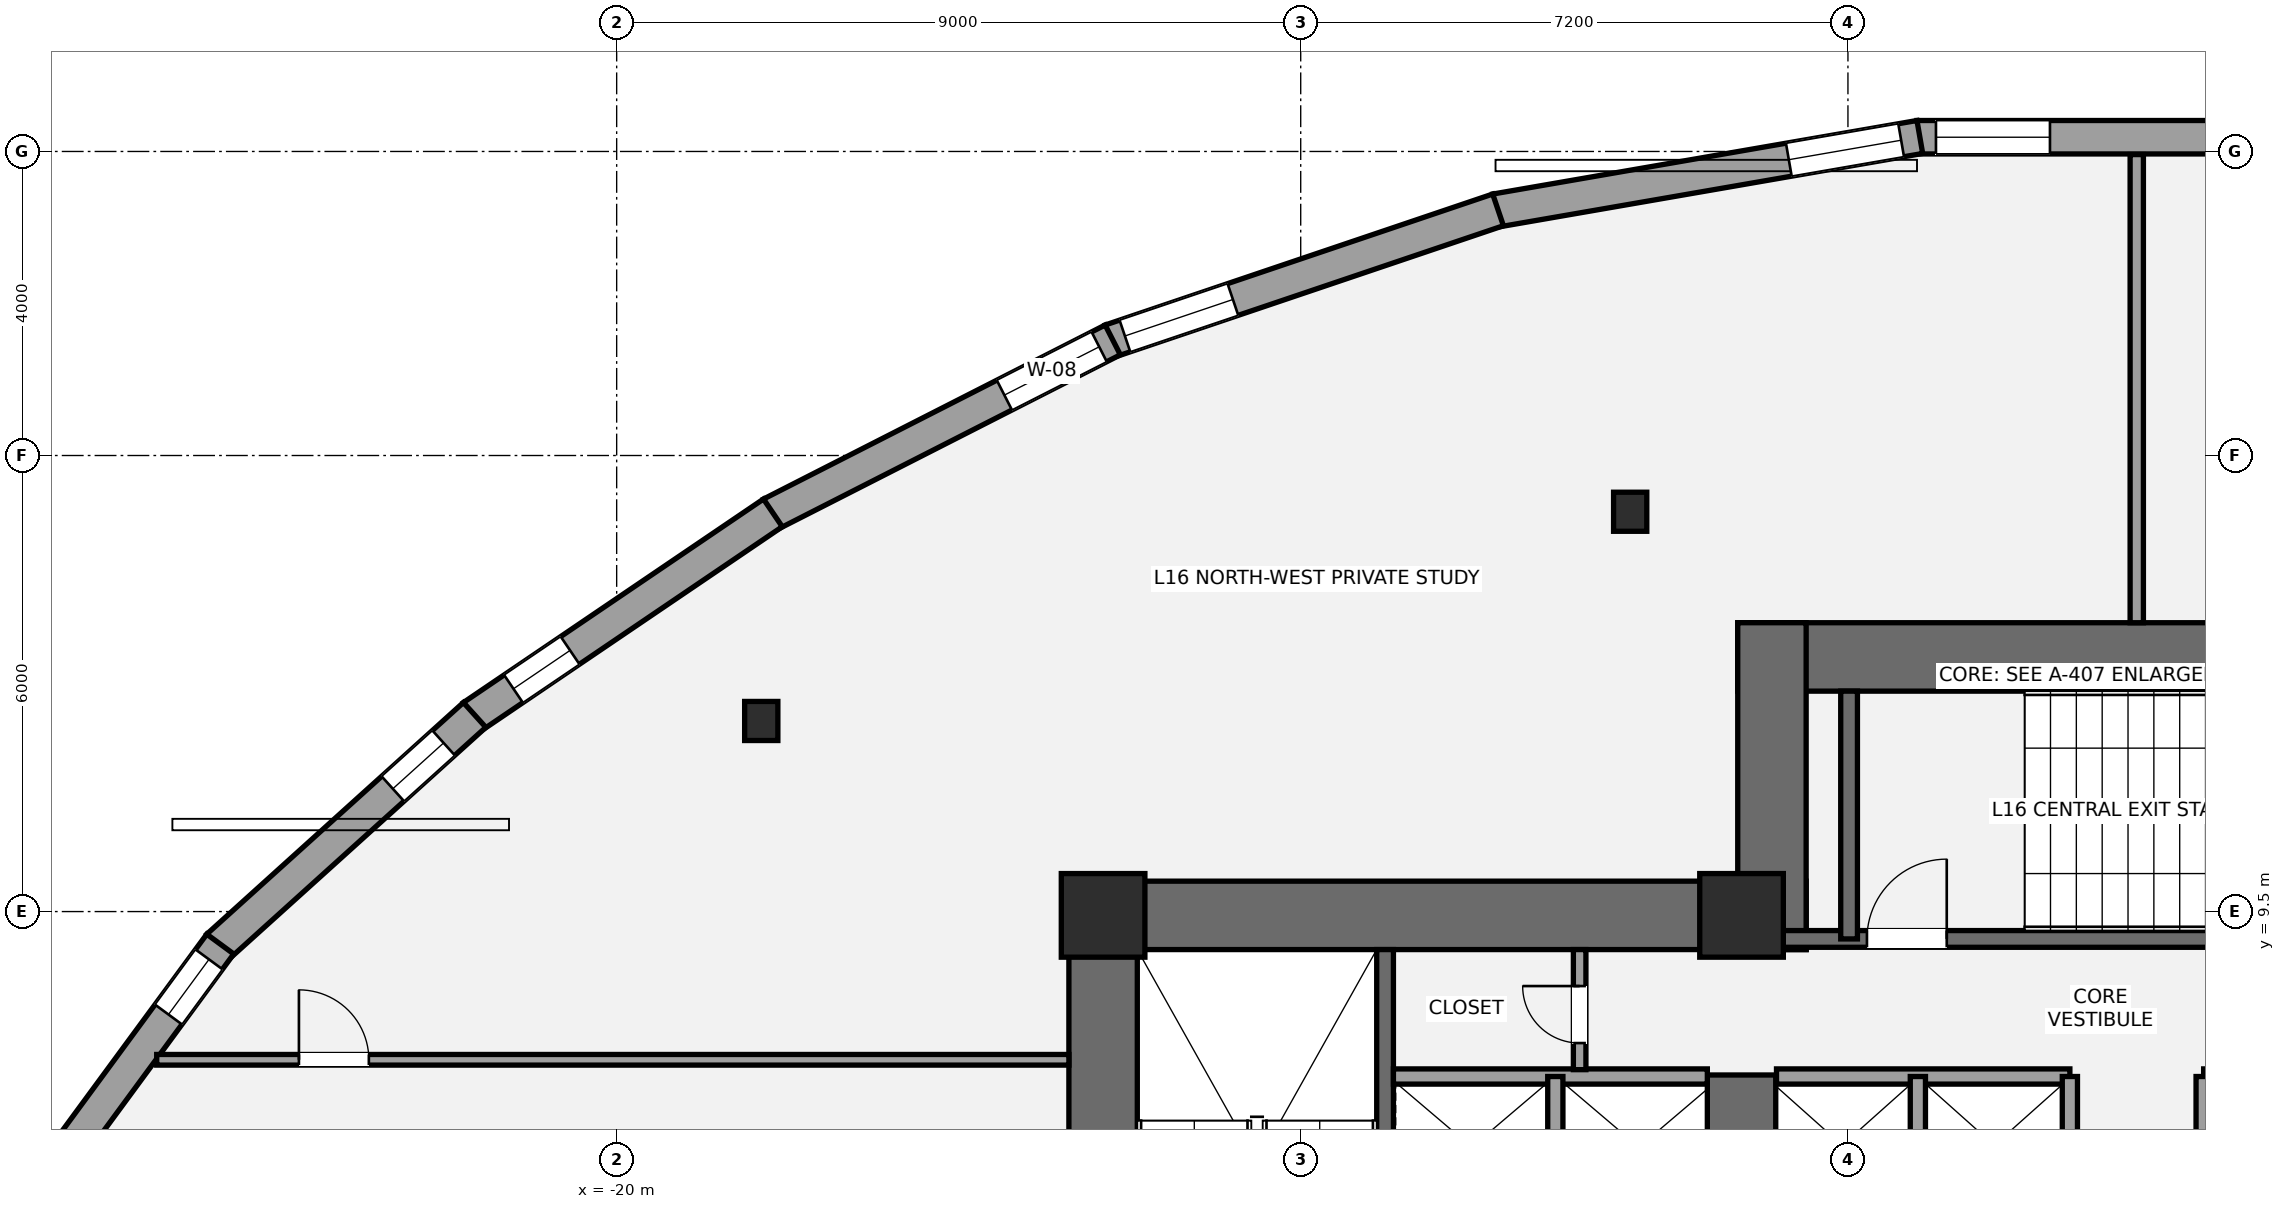
"""IFC4 building model, lengths in metres.
Left out: names, types, materials, properties, quantities, classifications, styles, units other than length and angle.
Written with IfcOpenShell. Run it as: python <this file> out.ifc"""

import sys

from ifc_helpers import new_model, si_unit, direction, frame, frame_2d, origin, origin_2d, place, context, subcontext, project, spatial, rectangle, i_section, extrude, element, fill, save


model = new_model("IFC4")
c1 = context("Model", 3, precision=1e-05, world=origin(), true_north=direction((0.0, 1.0)))
c2 = subcontext(c1, "Body", "Model", "MODEL_VIEW")
j1 = project(units=[si_unit("LENGTHUNIT", "METRE"), si_unit("PLANEANGLEUNIT", "RADIAN")], contexts=[c1])
p1 = place(None, origin())
s1 = spatial("IfcSite", under=j1, at=p1, CompositionType="ELEMENT")
p2 = place(p1, origin())
s2 = spatial("IfcBuilding", under=s1, at=p2, CompositionType="ELEMENT")
p3 = place(p2, frame((0.0, 0.0, 63.0)))
s3 = spatial("IfcBuildingStorey", under=s2, at=p3, CompositionType="ELEMENT", Elevation=63.0)
p4 = place(p3, frame((-13.6, 0.95, 0.0), z_axis=(0.0, 0.0, 1.0), x_axis=(0.0, 1.0, 0.0)))
e1 = element("IfcWall", 1, at=p4, inside=s3, PredefinedType="SHEAR", context=c2, shape_type="SweptSolid", body=[
    extrude(rectangle(XDim=8.95, YDim=0.9, at=frame_2d((4.475, 0.0))), origin(), (0.0, 0.0, 1.0), 3.6),
])
p5 = place(p3, frame((-14.05, 9.45, 0.0), z_axis=(0.0, 0.0, 1.0), x_axis=(1.0, 0.0, 0.0)))
e2 = element("IfcWall", 2, at=p5, inside=s3, PredefinedType="SHEAR", context=c2, shape_type="SweptSolid", body=[
    extrude(rectangle(XDim=9.7, YDim=0.9, at=frame_2d((4.85, 0.0))), origin(), (0.0, 0.0, 1.0), 3.6),
])
p6 = place(p3, frame((-5.2, 5.35, 0.0), z_axis=(0.0, 0.0, 1.0), x_axis=(0.0, 1.0, 0.0)))
e3 = element("IfcWall", 3, at=p6, inside=s3, PredefinedType="SHEAR", context=c2, shape_type="SweptSolid", body=[
    extrude(rectangle(XDim=2.0, YDim=0.9, at=frame_2d((1.0, 0.0))), origin(), (0.0, 0.0, 1.0), 3.6),
])
p7 = place(p3, frame((-9.89, 1.85, 0.0), z_axis=(0.0, 0.0, 1.0), x_axis=(0.0, 1.0, 0.0)))
e4 = element("IfcWall", 4, at=p7, inside=s3, PredefinedType="SHEAR", context=c2, shape_type="SweptSolid", body=[
    extrude(rectangle(XDim=7.15, YDim=0.22, at=frame_2d((3.575, 0.0))), origin(), (0.0, 0.0, 1.0), 3.6),
])
p8 = place(p3, frame((-5.25, 12.85, 0.0), z_axis=(0.0, 0.0, 1.0), x_axis=(1.0, 0.0, 0.0)))
e5 = element("IfcWall", 5, at=p8, inside=s3, PredefinedType="SHEAR", context=c2, shape_type="SweptSolid", body=[
    extrude(rectangle(XDim=10.5, YDim=0.9, at=frame_2d((5.25, 0.0))), origin(), (0.0, 0.0, 1.0), 3.6),
])
p9 = place(p3, frame((-4.8, 9.0, 0.0), z_axis=(0.0, 0.0, 1.0), x_axis=(0.0, 1.0, 0.0)))
e6 = element("IfcWall", 6, at=p9, inside=s3, PredefinedType="SHEAR", context=c2, shape_type="SweptSolid", body=[
    extrude(rectangle(XDim=4.3, YDim=0.9, at=frame_2d((2.15, 0.0))), origin(), (0.0, 0.0, 1.0), 3.6),
])
p10 = place(p3, frame((-4.7, 9.14, 0.0), z_axis=(0.0, 0.0, 1.0), x_axis=(1.0, 0.0, 0.0)))
e7 = element("IfcWall", 7, at=p10, inside=s3, PredefinedType="SHEAR", context=c2, shape_type="SweptSolid", body=[
    extrude(rectangle(XDim=9.3, YDim=0.22, at=frame_2d((4.65, 0.0))), origin(), (0.0, 0.0, 1.0), 3.6),
])
p11 = place(p10, frame((1.15, 0.0, 0.0)))
e8 = element("IfcOpeningElement", 8, at=p11, cuts=e7, PredefinedType="OPENING", context=c2, shape_type="SweptSolid", body=[
    extrude(rectangle(XDim=1.05, YDim=2.15, at=frame_2d((0.525, 1.075))), frame((0.0, 0.12, 0.0), z_axis=(0.0, -1.0, 0.0), x_axis=(1.0, 0.0, 0.0)), (0.0, 0.0, 1.0), 0.24),
])
p12 = place(p3, frame((-3.785, 9.14, 0.0), z_axis=(0.0, 0.0, 1.0), x_axis=(0.0, 1.0, 0.0)))
e9 = element("IfcWall", 9, at=p12, inside=s3, PredefinedType="SHEAR", context=c2, shape_type="SweptSolid", body=[
    extrude(rectangle(XDim=3.26, YDim=0.22, at=frame_2d((1.63, 0.0))), origin(), (0.0, 0.0, 1.0), 3.6),
])
for number, where, z_axis, x_axis in (
    (10, (-13.6, 9.45, 0.0), (0.0, 0.0, 1.0), (1.0, 0.0, 0.0)),
    (11, (-5.2, 9.45, 0.0), (0.0, 0.0, 1.0), (1.0, 0.0, 0.0)),
):
    element("IfcColumn", number, at=place(p3, frame(where, z_axis=z_axis, x_axis=x_axis)), inside=s3, PredefinedType="COLUMN", context=c2, shape_type="SweptSolid", body=[
        extrude(rectangle(XDim=1.1, YDim=1.1, at=origin_2d()), origin(), (0.0, 0.0, 1.0), 3.6),
    ])
for number, where, z_axis, x_axis in (
    (12, (-6.665, 14.76, 0.0), (0.0, 0.0, 1.0), (1.0, 0.0, 0.0)),
    (13, (-18.098, 12.007, 0.0), (0.0, 0.0, 1.0), (1.0, 0.0, 0.0)),
):
    element("IfcColumn", number, at=place(p3, frame(where, z_axis=z_axis, x_axis=x_axis)), inside=s3, PredefinedType="COLUMN", context=c2, shape_type="SweptSolid", body=[
        extrude(i_section(OverallWidth=0.437, OverallDepth=0.514, WebThickness=0.061, FlangeThickness=0.097, at=origin_2d()), origin(), (0.0, 0.0, 1.0), 3.6),
    ])
p13 = place(p3, frame((-2.892, 19.687, 0.0), z_axis=(0.0, 0.0, 1.0), x_axis=(1.0, 0.0, 0.0)))
e14 = element("IfcWall", 14, at=p13, inside=s3, PredefinedType="STANDARD", context=c2, shape_type="SweptSolid", body=[
    extrude(rectangle(XDim=5.784, YDim=0.44, at=frame_2d((2.892, 0.0))), origin(), (0.0, 0.0, 1.0), 2.529),
])
p14 = place(p13, frame((0.25, 0.0, 0.65)))
e15 = element("IfcOpeningElement", 15, at=p14, cuts=e14, PredefinedType="OPENING", context=c2, shape_type="SweptSolid", body=[
    extrude(rectangle(XDim=1.5, YDim=1.7, at=frame_2d((0.75, 0.85))), frame((0.0, 0.23, 0.0), z_axis=(0.0, -1.0, 0.0), x_axis=(1.0, 0.0, 0.0)), (0.0, 0.0, 1.0), 0.46),
])
p15 = place(p3, frame((-8.436, 18.723, 0.0), z_axis=(0.0, 0.0, 1.0), x_axis=(0.985308697227, 0.170782818716, 0.0)))
e16 = element("IfcWall", 16, at=p15, inside=s3, PredefinedType="STANDARD", context=c2, shape_type="SweptSolid", body=[
    extrude(rectangle(XDim=5.665, YDim=0.44, at=frame_2d((2.833, 0.0))), origin(), (0.0, 0.0, 1.0), 2.529),
])
p16 = place(p15, frame((3.916, 0.0, 0.65)))
e17 = element("IfcOpeningElement", 17, at=p16, cuts=e16, PredefinedType="OPENING", context=c2, shape_type="SweptSolid", body=[
    extrude(rectangle(XDim=1.5, YDim=1.7, at=frame_2d((0.75, 0.85))), frame((0.0, 0.23, 0.0), z_axis=(0.0, -1.0, 0.0), x_axis=(1.0, 0.0, 0.0)), (0.0, 0.0, 1.0), 0.46),
])
p17 = place(p3, frame((-13.502, 17.008, 0.0), z_axis=(0.0, 0.0, 1.0), x_axis=(0.947368862969, 0.320144088616, 0.0)))
e18 = element("IfcWall", 18, at=p17, inside=s3, PredefinedType="STANDARD", context=c2, shape_type="SweptSolid", body=[
    extrude(rectangle(XDim=5.382, YDim=0.44, at=frame_2d((2.691, 0.0))), origin(), (0.0, 0.0, 1.0), 2.529),
])
p18 = place(p17, frame((0.2, 0.0, 0.48)))
e19 = element("IfcOpeningElement", 19, at=p18, cuts=e18, PredefinedType="OPENING", context=c2, shape_type="SweptSolid", body=[
    extrude(rectangle(XDim=1.5, YDim=1.7, at=frame_2d((0.75, 0.85))), frame((0.0, 0.23, 0.0), z_axis=(0.0, -1.0, 0.0), x_axis=(1.0, 0.0, 0.0)), (0.0, 0.0, 1.0), 0.46),
])
p19 = place(p3, frame((-17.968, 14.731, 0.0), z_axis=(0.0, 0.0, 1.0), x_axis=(0.891072734441, 0.45386053137, 0.0)))
e20 = element("IfcWall", 20, at=p19, inside=s3, PredefinedType="STANDARD", context=c2, shape_type="SweptSolid", body=[
    extrude(rectangle(XDim=5.045, YDim=0.44, at=frame_2d((2.522, 0.0))), origin(), (0.0, 0.0, 1.0), 2.529),
])
p20 = place(p19, frame((3.445, 0.0, 0.58)))
e21 = element("IfcOpeningElement", 21, at=p20, cuts=e20, PredefinedType="OPENING", context=c2, shape_type="SweptSolid", body=[
    extrude(rectangle(XDim=1.4, YDim=1.55, at=frame_2d((0.7, 0.775))), frame((0.0, 0.23, 0.0), z_axis=(0.0, -1.0, 0.0), x_axis=(1.0, 0.0, 0.0)), (0.0, 0.0, 1.0), 0.46),
])
p21 = place(p3, frame((-21.893, 12.068, 0.0), z_axis=(0.0, 0.0, 1.0), x_axis=(0.827693991977, 0.561179699959, 0.0)))
e22 = element("IfcWall", 22, at=p21, inside=s3, PredefinedType="STANDARD", context=c2, shape_type="SweptSolid", body=[
    extrude(rectangle(XDim=4.77, YDim=0.44, at=frame_2d((2.385, 0.0))), origin(), (0.0, 0.0, 1.0), 2.529),
])
p22 = place(p21, frame((0.646, 0.0, 0.58)))
e23 = element("IfcOpeningElement", 23, at=p22, cuts=e22, PredefinedType="OPENING", context=c2, shape_type="SweptSolid", body=[
    extrude(rectangle(XDim=0.9, YDim=1.35, at=frame_2d((0.45, 0.675))), frame((0.0, 0.23, 0.0), z_axis=(0.0, -1.0, 0.0), x_axis=(1.0, 0.0, 0.0)), (0.0, 0.0, 1.0), 0.46),
])
p23 = place(p3, frame((-25.246, 9.039, 0.0), z_axis=(0.0, 0.0, 1.0), x_axis=(0.742354052059, 0.670007806963, 0.0)))
e24 = element("IfcWall", 24, at=p23, inside=s3, PredefinedType="STANDARD", context=c2, shape_type="SweptSolid", body=[
    extrude(rectangle(XDim=4.549, YDim=0.44, at=frame_2d((2.274, 0.0))), origin(), (0.0, 0.0, 1.0), 2.529),
])
p24 = place(p23, frame((3.099, 0.0, 0.58)))
e25 = element("IfcOpeningElement", 25, at=p24, cuts=e24, PredefinedType="OPENING", context=c2, shape_type="SweptSolid", body=[
    extrude(rectangle(XDim=0.9, YDim=1.35, at=frame_2d((0.45, 0.675))), frame((0.0, 0.23, 0.0), z_axis=(0.0, -1.0, 0.0), x_axis=(1.0, 0.0, 0.0)), (0.0, 0.0, 1.0), 0.46),
])
p25 = place(p3, frame((-27.757, 5.615, 0.0), z_axis=(0.0, 0.0, 1.0), x_axis=(0.592261182237, 0.80574604685, 0.0)))
e26 = element("IfcWall", 26, at=p25, inside=s3, PredefinedType="STANDARD", context=c2, shape_type="SweptSolid", body=[
    extrude(rectangle(XDim=4.291, YDim=0.44, at=frame_2d((2.146, 0.0))), origin(), (0.0, 0.0, 1.0), 2.529),
])
p26 = place(p25, frame((3.141, 0.0, 0.58)))
e27 = element("IfcOpeningElement", 27, at=p26, cuts=e26, PredefinedType="OPENING", context=c2, shape_type="SweptSolid", body=[
    extrude(rectangle(XDim=0.9, YDim=1.35, at=frame_2d((0.45, 0.675))), frame((0.0, 0.23, 0.0), z_axis=(0.0, -1.0, 0.0), x_axis=(1.0, 0.0, 0.0)), (0.0, 0.0, 1.0), 0.46),
])
p27 = place(p3, frame((-9.78, 7.33, 0.0), z_axis=(0.0, 0.0, 1.0), x_axis=(1.0, 0.0, 0.0)))
e28 = element("IfcWall", 28, at=p27, inside=s3, PredefinedType="SOLIDWALL", context=c2, shape_type="SweptSolid", body=[
    extrude(rectangle(XDim=4.13, YDim=0.2, at=frame_2d((2.065, 0.0))), origin(), (0.0, 0.0, 1.0), 3.4),
])
p28 = place(p3, frame((-7.65, 5.47, 0.0), z_axis=(0.0, 0.0, 1.0), x_axis=(0.0, 1.0, 0.0)))
e29 = element("IfcWall", 29, at=p28, inside=s3, PredefinedType="SOLIDWALL", context=c2, shape_type="SweptSolid", body=[
    extrude(rectangle(XDim=1.86, YDim=0.2, at=frame_2d((0.93, 0.0))), origin(), (0.0, 0.0, 1.0), 3.4),
])
for number, where, z_axis, x_axis in (
    (30, (-4.74, 7.33, 0.0), (0.0, 0.0, 1.0), (1.0, 0.0, 0.0)),
    (31, (0.88, 7.33, 0.0), (0.0, 0.0, 1.0), (1.0, 0.0, 0.0)),
):
    element("IfcWall", number, at=place(p3, frame(where, z_axis=z_axis, x_axis=x_axis)), inside=s3, PredefinedType="SOLIDWALL", context=c2, shape_type="SweptSolid", body=[
        extrude(rectangle(XDim=3.86, YDim=0.2, at=frame_2d((1.93, 0.0))), origin(), (0.0, 0.0, 1.0), 3.4),
    ])
for number, where, z_axis, x_axis in (
    (32, (-2.88, 5.52, 0.0), (0.0, 0.0, 1.0), (0.0, 1.0, 0.0)),
    (33, (-0.88, 5.52, 0.0), (0.0, 0.0, 1.0), (0.0, 1.0, 0.0)),
    (34, (0.88, 5.52, 0.0), (0.0, 0.0, 1.0), (0.0, 1.0, 0.0)),
):
    element("IfcWall", number, at=place(p3, frame(where, z_axis=z_axis, x_axis=x_axis)), inside=s3, PredefinedType="SOLIDWALL", context=c2, shape_type="SweptSolid", body=[
        extrude(rectangle(XDim=1.81, YDim=0.2, at=frame_2d((0.905, 0.0))), origin(), (0.0, 0.0, 1.0), 3.4),
    ])
p29 = place(p3, frame((-7.33, 7.42, 0.0), z_axis=(0.0, 0.0, 1.0), x_axis=(0.0, 1.0, 0.0)))
e35 = element("IfcWall", 35, at=p29, inside=s3, PredefinedType="PARTITIONING", context=c2, shape_type="SweptSolid", body=[
    extrude(rectangle(XDim=1.58, YDim=0.165, at=frame_2d((0.79, 0.0))), origin(), (0.0, 0.0, 1.0), 3.4),
])
p30 = place(p29, frame((0.35, 0.0, 0.0)))
e36 = element("IfcOpeningElement", 36, at=p30, cuts=e35, PredefinedType="OPENING", context=c2, shape_type="SweptSolid", body=[
    extrude(rectangle(XDim=0.75, YDim=2.1, at=frame_2d((0.375, 1.05))), frame((0.0, 0.093, 0.0), z_axis=(0.0, -1.0, 0.0), x_axis=(1.0, 0.0, 0.0)), (0.0, 0.0, 1.0), 0.185),
])
p31 = place(p3, frame((-26.052, 7.55, 0.0), z_axis=(0.0, 0.0, 1.0), x_axis=(1.0, 0.0, 0.0)))
e37 = element("IfcWall", 37, at=p31, inside=s3, PredefinedType="PARTITIONING", context=c2, shape_type="SweptSolid", body=[
    extrude(rectangle(XDim=12.002, YDim=0.14, at=frame_2d((6.001, 0.0))), origin(), (0.0, 0.0, 1.0), 2.853),
])
p32 = place(p31, frame((1.871, 0.0, 0.0)))
e38 = element("IfcOpeningElement", 38, at=p32, cuts=e37, PredefinedType="OPENING", context=c2, shape_type="SweptSolid", body=[
    extrude(rectangle(XDim=0.92, YDim=2.15, at=frame_2d((0.46, 1.075))), frame((0.0, 0.08, 0.0), z_axis=(0.0, -1.0, 0.0), x_axis=(1.0, 0.0, 0.0)), (0.0, 0.0, 1.0), 0.16),
])
p33 = place(p3, frame((0.0, 13.3, 0.0), z_axis=(0.0, 0.0, 1.0), x_axis=(0.0, 1.0, 0.0)))
e39 = element("IfcWall", 39, at=p33, inside=s3, PredefinedType="PARTITIONING", context=c2, shape_type="SweptSolid", body=[
    extrude(rectangle(XDim=6.159, YDim=0.175, at=frame_2d((3.08, 0.0))), origin(), (0.0, 0.0, 1.0), 3.4),
])
p34 = place(p14, origin())
e40 = element("IfcWindow", 40, at=p34, inside=s3, PartitioningType="SINGLE_PANEL", PredefinedType="WINDOW", context=c2, shape_type="SweptSolid", body=[
    extrude(rectangle(XDim=1.5, YDim=1.7, at=frame_2d((0.75, 0.85))), frame((0.0, -0.01, 0.0), z_axis=(0.0, -1.0, 0.0), x_axis=(1.0, 0.0, 0.0)), (0.0, 0.0, 1.0), 0.06),
])
fill(e15, e40)
p35 = place(p16, origin())
e41 = element("IfcWindow", 41, at=p35, inside=s3, PartitioningType="SINGLE_PANEL", PredefinedType="WINDOW", context=c2, shape_type="SweptSolid", body=[
    extrude(rectangle(XDim=1.5, YDim=1.7, at=frame_2d((0.75, 0.85))), frame((0.0, -0.01, 0.0), z_axis=(0.0, -1.0, 0.0), x_axis=(1.0, 0.0, 0.0)), (0.0, 0.0, 1.0), 0.06),
])
fill(e17, e41)
p36 = place(p18, origin())
e42 = element("IfcWindow", 42, at=p36, inside=s3, PartitioningType="SINGLE_PANEL", PredefinedType="WINDOW", context=c2, shape_type="SweptSolid", body=[
    extrude(rectangle(XDim=1.5, YDim=1.7, at=frame_2d((0.75, 0.85))), frame((0.0, -0.01, 0.0), z_axis=(0.0, -1.0, 0.0), x_axis=(1.0, 0.0, 0.0)), (0.0, 0.0, 1.0), 0.06),
])
fill(e19, e42)
p37 = place(p20, origin())
e43 = element("IfcWindow", 43, at=p37, inside=s3, PartitioningType="SINGLE_PANEL", PredefinedType="WINDOW", context=c2, shape_type="SweptSolid", body=[
    extrude(rectangle(XDim=1.4, YDim=1.55, at=frame_2d((0.7, 0.775))), frame((0.0, -0.01, 0.0), z_axis=(0.0, -1.0, 0.0), x_axis=(1.0, 0.0, 0.0)), (0.0, 0.0, 1.0), 0.06),
])
fill(e21, e43)
p38 = place(p22, origin())
e44 = element("IfcWindow", 44, at=p38, inside=s3, PartitioningType="SINGLE_PANEL", PredefinedType="WINDOW", context=c2, shape_type="SweptSolid", body=[
    extrude(rectangle(XDim=0.9, YDim=1.35, at=frame_2d((0.45, 0.675))), frame((0.0, -0.01, 0.0), z_axis=(0.0, -1.0, 0.0), x_axis=(1.0, 0.0, 0.0)), (0.0, 0.0, 1.0), 0.06),
])
fill(e23, e44)
p39 = place(p24, origin())
e45 = element("IfcWindow", 45, at=p39, inside=s3, PartitioningType="SINGLE_PANEL", PredefinedType="WINDOW", context=c2, shape_type="SweptSolid", body=[
    extrude(rectangle(XDim=0.9, YDim=1.35, at=frame_2d((0.45, 0.675))), frame((0.0, -0.01, 0.0), z_axis=(0.0, -1.0, 0.0), x_axis=(1.0, 0.0, 0.0)), (0.0, 0.0, 1.0), 0.06),
])
fill(e25, e45)
p40 = place(p26, origin())
e46 = element("IfcWindow", 46, at=p40, inside=s3, PartitioningType="SINGLE_PANEL", PredefinedType="WINDOW", context=c2, shape_type="SweptSolid", body=[
    extrude(rectangle(XDim=0.9, YDim=1.35, at=frame_2d((0.45, 0.675))), frame((0.0, -0.01, 0.0), z_axis=(0.0, -1.0, 0.0), x_axis=(1.0, 0.0, 0.0)), (0.0, 0.0, 1.0), 0.06),
])
fill(e27, e46)
p41 = place(p11, origin())
e47 = element("IfcDoor", 47, at=p41, inside=s3, OperationType="SINGLE_SWING_RIGHT", PredefinedType="DOOR", context=c2, shape_type="SweptSolid", body=[
    extrude(rectangle(XDim=1.05, YDim=2.15, at=frame_2d((0.525, 1.075))), frame((0.0, 0.025, 0.0), z_axis=(0.0, -1.0, 0.0), x_axis=(1.0, 0.0, 0.0)), (0.0, 0.0, 1.0), 0.05),
])
fill(e8, e47)
p42 = place(p30, origin())
e48 = element("IfcDoor", 48, at=p42, inside=s3, OperationType="SINGLE_SWING_RIGHT", PredefinedType="DOOR", context=c2, shape_type="SweptSolid", body=[
    extrude(rectangle(XDim=0.75, YDim=2.1, at=frame_2d((0.375, 1.05))), frame((0.0, 0.025, 0.0), z_axis=(0.0, -1.0, 0.0), x_axis=(1.0, 0.0, 0.0)), (0.0, 0.0, 1.0), 0.05),
])
fill(e36, e48)
p43 = place(p32, origin())
e49 = element("IfcDoor", 49, at=p43, inside=s3, OperationType="SINGLE_SWING_LEFT", PredefinedType="DOOR", context=c2, shape_type="SweptSolid", body=[
    extrude(rectangle(XDim=0.92, YDim=2.15, at=frame_2d((0.46, 1.075))), frame((0.0, 0.025, 0.0), z_axis=(0.0, -1.0, 0.0), x_axis=(1.0, 0.0, 0.0)), (0.0, 0.0, 1.0), 0.05),
])
fill(e38, e49)
save(model, sys.argv[1])
